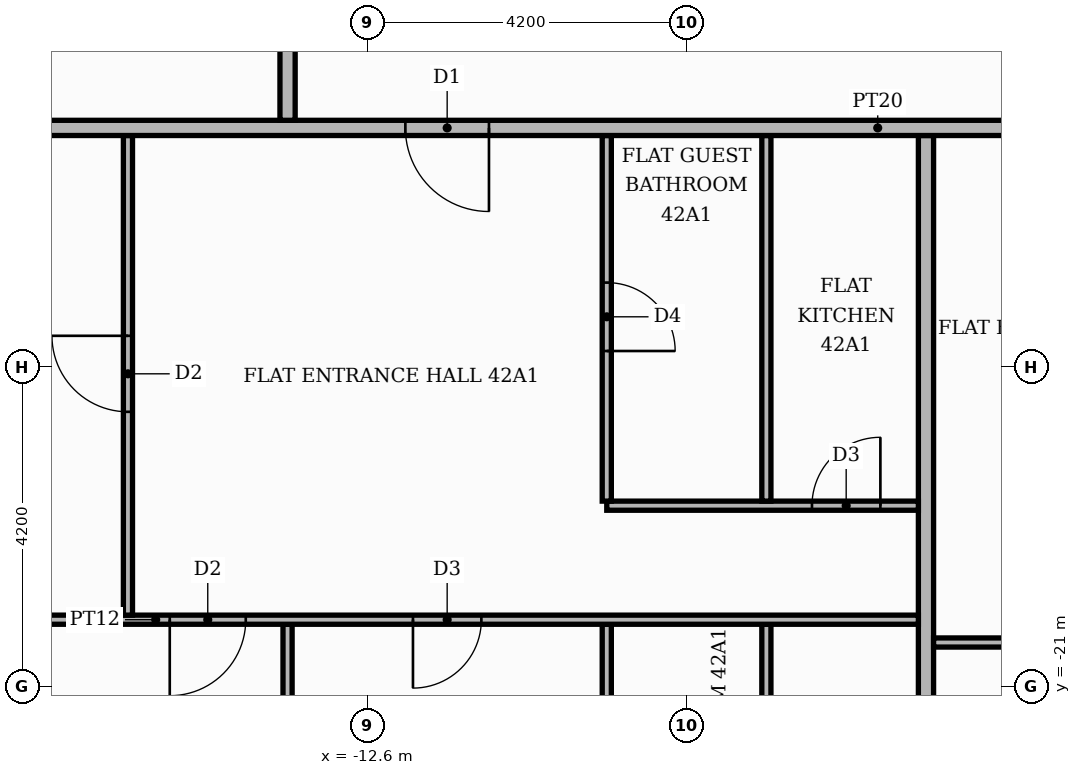
"""IFC4 building model, lengths in metres.
Left out: names, types, materials, properties, quantities, classifications, styles, units other than length and angle.
Written with IfcOpenShell. Run it as: python <this file> out.ifc"""

import sys

from ifc_helpers import new_model, si_unit, direction, frame, frame_2d, origin, place, context, subcontext, project, spatial, rectangle, extrude, element, fill, save


model = new_model("IFC4")
c1 = context("Model", 3, precision=1e-05, world=origin(), true_north=direction((0.0, 1.0)))
c2 = subcontext(c1, "Body", "Model", "MODEL_VIEW")
j1 = project(units=[si_unit("LENGTHUNIT", "METRE"), si_unit("PLANEANGLEUNIT", "RADIAN")], contexts=[c1])
p1 = place(None, origin())
s1 = spatial("IfcSite", under=j1, at=p1, CompositionType="ELEMENT")
p2 = place(p1, origin())
s2 = spatial("IfcBuilding", under=s1, at=p2, CompositionType="ELEMENT")
p3 = place(p2, frame((0.0, 0.0, 176.7)))
s3 = spatial("IfcBuildingStorey", under=s2, at=p3, CompositionType="ELEMENT", Elevation=176.7)
p4 = place(p3, frame((-13.65, -25.42, 0.0), z_axis=(0.0, 0.0, 1.0), x_axis=(0.0, 1.0, 0.0)))
e1 = element("IfcWall", 1, at=p4, inside=s3, PredefinedType="PARTITIONING", context=c2, shape_type="SweptSolid", body=[
    extrude(rectangle(XDim=5.24, YDim=0.12, at=frame_2d((2.62, 0.0))), origin(), (0.0, 0.0, 1.0), 3.4),
])
p5 = place(p3, frame((-9.45, -25.42, 0.0), z_axis=(0.0, 0.0, 1.0), x_axis=(0.0, 1.0, 0.0)))
e2 = element("IfcWall", 2, at=p5, inside=s3, PredefinedType="PARTITIONING", context=c2, shape_type="SweptSolid", body=[
    extrude(rectangle(XDim=5.24, YDim=0.12, at=frame_2d((2.62, 0.0))), origin(), (0.0, 0.0, 1.0), 3.4),
])
p6 = place(p5, frame((2.05, 0.0, 0.0)))
e3 = element("IfcOpeningElement", 3, at=p6, cuts=e2, PredefinedType="OPENING", context=c2, shape_type="SweptSolid", body=[
    extrude(rectangle(XDim=0.9, YDim=2.1, at=frame_2d((0.45, 1.05))), frame((0.0, 0.07, 0.0), z_axis=(0.0, -1.0, 0.0), x_axis=(1.0, 0.0, 0.0)), (0.0, 0.0, 1.0), 0.14),
])
p7 = place(p3, frame((-7.35, -25.42, 0.0), z_axis=(0.0, 0.0, 1.0), x_axis=(0.0, 1.0, 0.0)))
e4 = element("IfcWall", 4, at=p7, inside=s3, PredefinedType="PARTITIONING", context=c2, shape_type="SweptSolid", body=[
    extrude(rectangle(XDim=5.24, YDim=0.12, at=frame_2d((2.62, 0.0))), origin(), (0.0, 0.0, 1.0), 3.4),
])
p8 = place(p7, frame((2.05, 0.0, 0.0)))
e5 = element("IfcOpeningElement", 5, at=p8, cuts=e4, PredefinedType="OPENING", context=c2, shape_type="SweptSolid", body=[
    extrude(rectangle(XDim=0.9, YDim=2.1, at=frame_2d((0.45, 1.05))), frame((0.0, 0.07, 0.0), z_axis=(0.0, -1.0, 0.0), x_axis=(1.0, 0.0, 0.0)), (0.0, 0.0, 1.0), 0.14),
])
p9 = place(p3, frame((-5.25, -25.42, 0.0), z_axis=(0.0, 0.0, 1.0), x_axis=(0.0, 1.0, 0.0)))
e6 = element("IfcWall", 6, at=p9, inside=s3, PredefinedType="PARTITIONING", context=c2, shape_type="SweptSolid", body=[
    extrude(rectangle(XDim=11.67, YDim=0.2, at=frame_2d((5.835, 0.0))), origin(), (0.0, 0.0, 1.0), 3.4),
])
p10 = place(p3, frame((-5.15, -20.42, 0.0), z_axis=(0.0, 0.0, 1.0), x_axis=(1.0, 0.0, 0.0)))
e7 = element("IfcWall", 7, at=p10, inside=s3, PredefinedType="PARTITIONING", context=c2, shape_type="SweptSolid", body=[
    extrude(rectangle(XDim=18.7, YDim=0.12, at=frame_2d((9.35, 0.0))), origin(), (0.0, 0.0, 1.0), 3.4),
])
p11 = place(p10, frame((1.5, 0.0, 0.0)))
e8 = element("IfcOpeningElement", 8, at=p11, cuts=e7, PredefinedType="OPENING", context=c2, shape_type="SweptSolid", body=[
    extrude(rectangle(XDim=1.0, YDim=2.1, at=frame_2d((0.5, 1.05))), frame((0.0, 0.07, 0.0), z_axis=(0.0, -1.0, 0.0), x_axis=(1.0, 0.0, 0.0)), (0.0, 0.0, 1.0), 0.14),
])
p12 = place(p10, frame((5.75, 0.0, 0.0)))
e9 = element("IfcOpeningElement", 9, at=p12, cuts=e7, PredefinedType="OPENING", context=c2, shape_type="SweptSolid", body=[
    extrude(rectangle(XDim=0.9, YDim=2.1, at=frame_2d((0.45, 1.05))), frame((0.0, 0.07, 0.0), z_axis=(0.0, -1.0, 0.0), x_axis=(1.0, 0.0, 0.0)), (0.0, 0.0, 1.0), 0.14),
])
p13 = place(p10, frame((14.15, 0.0, 0.0)))
e10 = element("IfcOpeningElement", 10, at=p13, cuts=e7, PredefinedType="OPENING", context=c2, shape_type="SweptSolid", body=[
    extrude(rectangle(XDim=0.9, YDim=2.1, at=frame_2d((0.45, 1.05))), frame((0.0, 0.07, 0.0), z_axis=(0.0, -1.0, 0.0), x_axis=(1.0, 0.0, 0.0)), (0.0, 0.0, 1.0), 0.14),
])
p14 = place(p3, frame((-25.42, -20.12, 0.0), z_axis=(0.0, 0.0, 1.0), x_axis=(1.0, 0.0, 0.0)))
e11 = element("IfcWall", 11, at=p14, inside=s3, PredefinedType="PARTITIONING", context=c2, shape_type="SweptSolid", body=[
    extrude(rectangle(XDim=20.07, YDim=0.12, at=frame_2d((10.035, 0.0))), origin(), (0.0, 0.0, 1.0), 3.4),
])
p15 = place(p14, frame((10.22, 0.0, 0.0)))
e12 = element("IfcOpeningElement", 12, at=p15, cuts=e11, PredefinedType="OPENING", context=c2, shape_type="SweptSolid", body=[
    extrude(rectangle(XDim=1.0, YDim=2.1, at=frame_2d((0.5, 1.05))), frame((0.0, 0.07, 0.0), z_axis=(0.0, -1.0, 0.0), x_axis=(1.0, 0.0, 0.0)), (0.0, 0.0, 1.0), 0.14),
])
p16 = place(p14, frame((13.42, 0.0, 0.0)))
e13 = element("IfcOpeningElement", 13, at=p16, cuts=e11, PredefinedType="OPENING", context=c2, shape_type="SweptSolid", body=[
    extrude(rectangle(XDim=0.9, YDim=2.1, at=frame_2d((0.45, 1.05))), frame((0.0, 0.07, 0.0), z_axis=(0.0, -1.0, 0.0), x_axis=(1.0, 0.0, 0.0)), (0.0, 0.0, 1.0), 0.14),
])
p17 = place(p3, frame((-15.75, -20.06, 0.0), z_axis=(0.0, 0.0, 1.0), x_axis=(0.0, 1.0, 0.0)))
e14 = element("IfcWall", 14, at=p17, inside=s3, PredefinedType="PARTITIONING", context=c2, shape_type="SweptSolid", body=[
    extrude(rectangle(XDim=6.31, YDim=0.12, at=frame_2d((3.155, 0.0))), origin(), (0.0, 0.0, 1.0), 3.4),
])
p18 = place(p17, frame((2.675, 0.0, 0.0)))
e15 = element("IfcOpeningElement", 15, at=p18, cuts=e14, PredefinedType="OPENING", context=c2, shape_type="SweptSolid", body=[
    extrude(rectangle(XDim=1.0, YDim=2.1, at=frame_2d((0.5, 1.05))), frame((0.0, 0.07, 0.0), z_axis=(0.0, -1.0, 0.0), x_axis=(1.0, 0.0, 0.0)), (0.0, 0.0, 1.0), 0.14),
])
p19 = place(p3, frame((-9.45, -18.62, 0.0), z_axis=(0.0, 0.0, 1.0), x_axis=(1.0, 0.0, 0.0)))
e16 = element("IfcWall", 16, at=p19, inside=s3, PredefinedType="PARTITIONING", context=c2, shape_type="SweptSolid", body=[
    extrude(rectangle(XDim=4.1, YDim=0.12, at=frame_2d((2.05, 0.0))), origin(), (0.0, 0.0, 1.0), 3.4),
])
p20 = place(p19, frame((2.7, 0.0, 0.0)))
e17 = element("IfcOpeningElement", 17, at=p20, cuts=e16, PredefinedType="OPENING", context=c2, shape_type="SweptSolid", body=[
    extrude(rectangle(XDim=0.9, YDim=2.1, at=frame_2d((0.45, 1.05))), frame((0.0, 0.07, 0.0), z_axis=(0.0, -1.0, 0.0), x_axis=(1.0, 0.0, 0.0)), (0.0, 0.0, 1.0), 0.14),
])
p21 = place(p3, frame((-9.45, -18.56, 0.0), z_axis=(0.0, 0.0, 1.0), x_axis=(0.0, 1.0, 0.0)))
e18 = element("IfcWall", 18, at=p21, inside=s3, PredefinedType="PARTITIONING", context=c2, shape_type="SweptSolid", body=[
    extrude(rectangle(XDim=4.81, YDim=0.12, at=frame_2d((2.405, 0.0))), origin(), (0.0, 0.0, 1.0), 3.4),
])
p22 = place(p21, frame((1.975, 0.0, 0.0)))
e19 = element("IfcOpeningElement", 19, at=p22, cuts=e18, PredefinedType="OPENING", context=c2, shape_type="SweptSolid", body=[
    extrude(rectangle(XDim=0.9, YDim=2.1, at=frame_2d((0.45, 1.05))), frame((0.0, 0.07, 0.0), z_axis=(0.0, -1.0, 0.0), x_axis=(1.0, 0.0, 0.0)), (0.0, 0.0, 1.0), 0.14),
])
p23 = place(p3, frame((-7.35, -18.56, 0.0), z_axis=(0.0, 0.0, 1.0), x_axis=(0.0, 1.0, 0.0)))
e20 = element("IfcWall", 20, at=p23, inside=s3, PredefinedType="PARTITIONING", context=c2, shape_type="SweptSolid", body=[
    extrude(rectangle(XDim=4.81, YDim=0.12, at=frame_2d((2.405, 0.0))), origin(), (0.0, 0.0, 1.0), 3.4),
])
p24 = place(p3, frame((-25.42, -13.65, 0.0), z_axis=(0.0, 0.0, 1.0), x_axis=(1.0, 0.0, 0.0)))
e21 = element("IfcWall", 21, at=p24, inside=s3, PredefinedType="PARTITIONING", context=c2, shape_type="SweptSolid", body=[
    extrude(rectangle(XDim=39.07, YDim=0.2, at=frame_2d((19.535, 0.0))), origin(), (0.0, 0.0, 1.0), 3.4),
])
p25 = place(p24, frame((13.32, 0.0, 0.0)))
e22 = element("IfcOpeningElement", 22, at=p25, cuts=e21, PredefinedType="OPENING", context=c2, shape_type="SweptSolid", body=[
    extrude(rectangle(XDim=1.1, YDim=2.4, at=frame_2d((0.55, 1.2))), frame((0.0, 0.11, 0.0), z_axis=(0.0, -1.0, 0.0), x_axis=(1.0, 0.0, 0.0)), (0.0, 0.0, 1.0), 0.22),
])
p26 = place(p24, frame((21.72, 0.0, 0.0)))
e23 = element("IfcOpeningElement", 23, at=p26, cuts=e21, PredefinedType="OPENING", context=c2, shape_type="SweptSolid", body=[
    extrude(rectangle(XDim=1.1, YDim=2.4, at=frame_2d((0.55, 1.2))), frame((0.0, 0.11, 0.0), z_axis=(0.0, -1.0, 0.0), x_axis=(1.0, 0.0, 0.0)), (0.0, 0.0, 1.0), 0.22),
])
p27 = place(p3, frame((-13.65, -13.55, 0.0), z_axis=(0.0, 0.0, 1.0), x_axis=(0.0, 1.0, 0.0)))
e24 = element("IfcWall", 24, at=p27, inside=s3, PredefinedType="PARTITIONING", context=c2, shape_type="SweptSolid", body=[
    extrude(rectangle(XDim=2.45, YDim=0.2, at=frame_2d((1.225, 0.0))), origin(), (0.0, 0.0, 1.0), 3.4),
])
p28 = place(p25, frame((1.1, 0.0, 0.0), z_axis=(0.0, 0.0, 1.0), x_axis=(-1.0, 0.0, 0.0)))
e25 = element("IfcDoor", 25, at=p28, inside=s3, OperationType="SINGLE_SWING_RIGHT", PredefinedType="DOOR", context=c2, shape_type="SweptSolid", body=[
    extrude(rectangle(XDim=1.1, YDim=2.4, at=frame_2d((0.55, 1.2))), frame((0.0, 0.025, 0.0), z_axis=(0.0, -1.0, 0.0), x_axis=(1.0, 0.0, 0.0)), (0.0, 0.0, 1.0), 0.05),
])
fill(e22, e25)
p29 = place(p18, origin())
e26 = element("IfcDoor", 26, at=p29, inside=s3, OperationType="SINGLE_SWING_RIGHT", PredefinedType="DOOR", context=c2, shape_type="SweptSolid", body=[
    extrude(rectangle(XDim=1.0, YDim=2.1, at=frame_2d((0.5, 1.05))), frame((0.0, 0.025, 0.0), z_axis=(0.0, -1.0, 0.0), x_axis=(1.0, 0.0, 0.0)), (0.0, 0.0, 1.0), 0.05),
])
fill(e15, e26)
p30 = place(p22, frame((0.9, 0.0, 0.0), z_axis=(0.0, 0.0, 1.0), x_axis=(-1.0, 0.0, 0.0)))
e27 = element("IfcDoor", 27, at=p30, inside=s3, OperationType="SINGLE_SWING_LEFT", PredefinedType="DOOR", context=c2, shape_type="SweptSolid", body=[
    extrude(rectangle(XDim=0.9, YDim=2.1, at=frame_2d((0.45, 1.05))), frame((0.0, 0.025, 0.0), z_axis=(0.0, -1.0, 0.0), x_axis=(1.0, 0.0, 0.0)), (0.0, 0.0, 1.0), 0.05),
])
fill(e19, e27)
p31 = place(p20, origin())
e28 = element("IfcDoor", 28, at=p31, inside=s3, OperationType="SINGLE_SWING_RIGHT", PredefinedType="DOOR", context=c2, shape_type="SweptSolid", body=[
    extrude(rectangle(XDim=0.9, YDim=2.1, at=frame_2d((0.45, 1.05))), frame((0.0, 0.025, 0.0), z_axis=(0.0, -1.0, 0.0), x_axis=(1.0, 0.0, 0.0)), (0.0, 0.0, 1.0), 0.05),
])
fill(e17, e28)
p32 = place(p15, frame((1.0, 0.0, 0.0), z_axis=(0.0, 0.0, 1.0), x_axis=(-1.0, 0.0, 0.0)))
e29 = element("IfcDoor", 29, at=p32, inside=s3, OperationType="SINGLE_SWING_LEFT", PredefinedType="DOOR", context=c2, shape_type="SweptSolid", body=[
    extrude(rectangle(XDim=1.0, YDim=2.1, at=frame_2d((0.5, 1.05))), frame((0.0, 0.025, 0.0), z_axis=(0.0, -1.0, 0.0), x_axis=(1.0, 0.0, 0.0)), (0.0, 0.0, 1.0), 0.05),
])
fill(e12, e29)
p33 = place(p16, frame((0.9, 0.0, 0.0), z_axis=(0.0, 0.0, 1.0), x_axis=(-1.0, 0.0, 0.0)))
e30 = element("IfcDoor", 30, at=p33, inside=s3, OperationType="SINGLE_SWING_LEFT", PredefinedType="DOOR", context=c2, shape_type="SweptSolid", body=[
    extrude(rectangle(XDim=0.9, YDim=2.1, at=frame_2d((0.45, 1.05))), frame((0.0, 0.025, 0.0), z_axis=(0.0, -1.0, 0.0), x_axis=(1.0, 0.0, 0.0)), (0.0, 0.0, 1.0), 0.05),
])
fill(e13, e30)
save(model, sys.argv[1])
